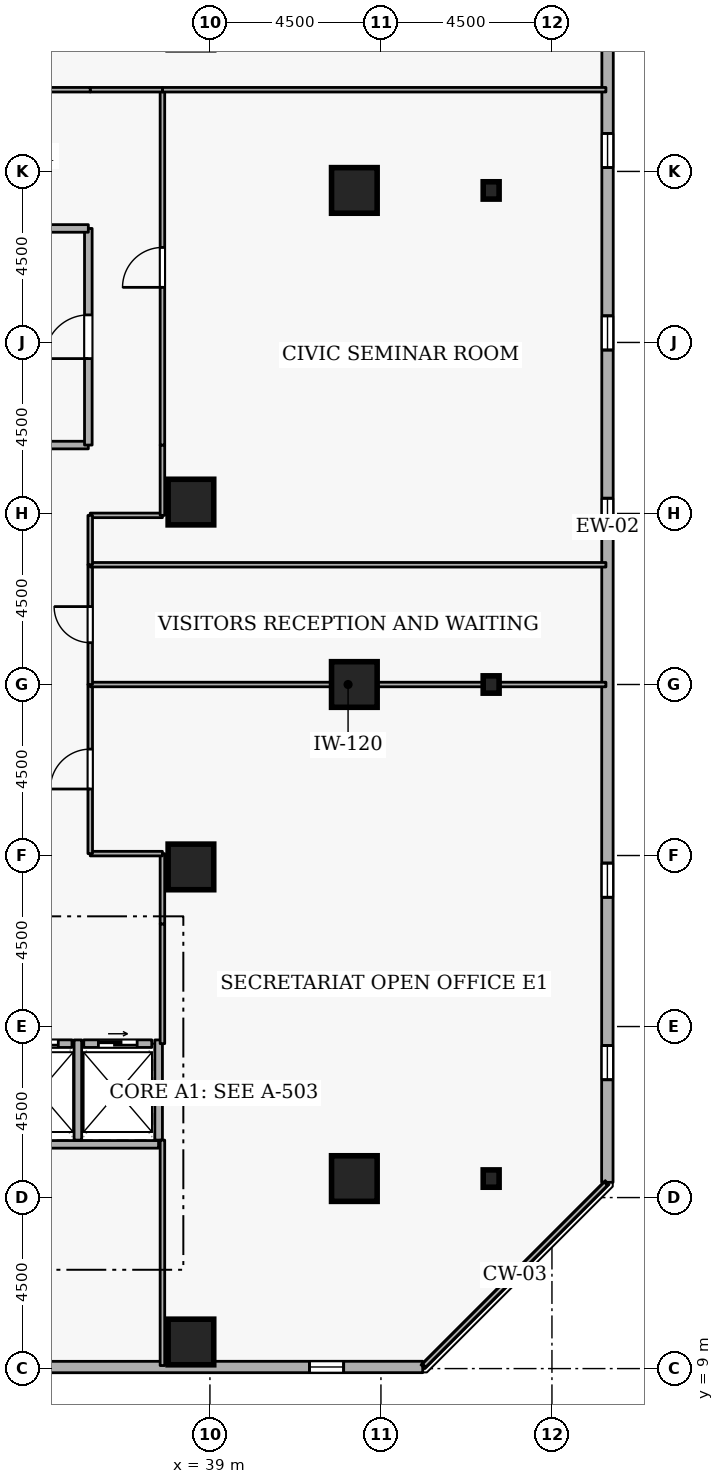
"""IFC4 building model, lengths in metres.
Left out: names, types, materials, properties, quantities, classifications, styles, units other than length and angle.
Written with IfcOpenShell. Run it as: python <this file> out.ifc"""

import sys

from ifc_helpers import new_model, si_unit, direction, frame, frame_2d, origin, origin_2d, place, context, subcontext, project, spatial, rectangle, i_section, extrude, element, fill, save


model = new_model("IFC4")
c1 = context("Model", 3, precision=1e-05, world=origin(), true_north=direction((0.0, 1.0)))
c2 = subcontext(c1, "Body", "Model", "MODEL_VIEW")
j1 = project(units=[si_unit("LENGTHUNIT", "METRE"), si_unit("PLANEANGLEUNIT", "RADIAN")], contexts=[c1])
p1 = place(None, origin())
s1 = spatial("IfcSite", under=j1, at=p1, CompositionType="ELEMENT")
p2 = place(p1, origin())
s2 = spatial("IfcBuilding", under=s1, at=p2, CompositionType="ELEMENT")
p3 = place(p2, frame((0.0, 0.0, 90.9)))
s3 = spatial("IfcBuildingStorey", under=s2, at=p3, CompositionType="ELEMENT", Elevation=90.9)
for number, where, z_axis, x_axis in (
    (1, (38.5, 9.7, 0.0), (0.0, 0.0, 1.0), (1.0, 0.0, 0.0)),
    (2, (42.8, 14.0, 0.0), (0.0, 0.0, 1.0), (1.0, 0.0, 0.0)),
    (3, (42.8, 27.0, 0.0), (0.0, 0.0, 1.0), (1.0, 0.0, 0.0)),
    (4, (42.8, 40.0, 0.0), (0.0, 0.0, 1.0), (1.0, 0.0, 0.0)),
    (5, (38.5, 22.2, 0.0), (0.0, 0.0, 1.0), (1.0, 0.0, 0.0)),
    (6, (38.5, 31.8, 0.0), (0.0, 0.0, 1.0), (1.0, 0.0, 0.0)),
):
    element("IfcColumn", number, at=place(p3, frame(where, z_axis=z_axis, x_axis=x_axis)), inside=s3, PredefinedType="COLUMN", context=c2, shape_type="SweptSolid", body=[
        extrude(rectangle(XDim=1.2, YDim=1.2, at=origin_2d()), origin(), (0.0, 0.0, 1.0), 3.6),
    ])
for number, where, z_axis, x_axis in (
    (7, (46.4, 14.0, 0.0), (0.0, 0.0, 1.0), (1.0, 0.0, 0.0)),
    (8, (46.4, 27.0, 0.0), (0.0, 0.0, 1.0), (1.0, 0.0, 0.0)),
    (9, (46.4, 40.0, 0.0), (0.0, 0.0, 1.0), (1.0, 0.0, 0.0)),
):
    element("IfcColumn", number, at=place(p3, frame(where, z_axis=z_axis, x_axis=x_axis)), inside=s3, PredefinedType="COLUMN", context=c2, shape_type="SweptSolid", body=[
        extrude(i_section(OverallWidth=0.418, OverallDepth=0.456, WebThickness=0.042, FlangeThickness=0.067, FilletRadius=0.015, at=origin_2d()), origin(), (0.0, 0.0, 1.0), 3.6),
    ])
p4 = place(p3, frame((10.119, 9.035, 0.0), z_axis=(0.0, 0.0, 1.0), x_axis=(0.99999997744, 0.000212414941, 0.0)))
e10 = element("IfcWall", 10, at=p4, inside=s3, PredefinedType="STANDARD", context=c2, shape_type="SweptSolid", body=[
    extrude(rectangle(XDim=34.481, YDim=0.3, at=frame_2d((17.24, 0.0))), origin(), (0.0, 0.0, 1.0), 2.7),
])
p5 = place(p4, frame((7.5, 0.0, 0.72)))
e11 = element("IfcOpeningElement", 11, at=p5, cuts=e10, PredefinedType="OPENING", context=c2, shape_type="SweptSolid", body=[
    extrude(rectangle(XDim=0.9, YDim=1.75, at=frame_2d((0.45, 0.875))), frame((0.0, 0.16, 0.0), z_axis=(0.0, -1.0, 0.0), x_axis=(1.0, 0.0, 0.0)), (0.0, 0.0, 1.0), 0.32),
])
p6 = place(p4, frame((12.3, 0.0, 0.72)))
e12 = element("IfcOpeningElement", 12, at=p6, cuts=e10, PredefinedType="OPENING", context=c2, shape_type="SweptSolid", body=[
    extrude(rectangle(XDim=0.9, YDim=1.75, at=frame_2d((0.45, 0.875))), frame((0.0, 0.16, 0.0), z_axis=(0.0, -1.0, 0.0), x_axis=(1.0, 0.0, 0.0)), (0.0, 0.0, 1.0), 0.32),
])
p7 = place(p4, frame((17.1, 0.0, 0.72)))
e13 = element("IfcOpeningElement", 13, at=p7, cuts=e10, PredefinedType="OPENING", context=c2, shape_type="SweptSolid", body=[
    extrude(rectangle(XDim=0.9, YDim=1.75, at=frame_2d((0.45, 0.875))), frame((0.0, 0.16, 0.0), z_axis=(0.0, -1.0, 0.0), x_axis=(1.0, 0.0, 0.0)), (0.0, 0.0, 1.0), 0.32),
])
p8 = place(p4, frame((21.9, 0.0, 0.72)))
e14 = element("IfcOpeningElement", 14, at=p8, cuts=e10, PredefinedType="OPENING", context=c2, shape_type="SweptSolid", body=[
    extrude(rectangle(XDim=0.9, YDim=1.75, at=frame_2d((0.45, 0.875))), frame((0.0, 0.16, 0.0), z_axis=(0.0, -1.0, 0.0), x_axis=(1.0, 0.0, 0.0)), (0.0, 0.0, 1.0), 0.32),
])
p9 = place(p4, frame((31.5, 0.0, 0.72)))
e15 = element("IfcOpeningElement", 15, at=p9, cuts=e10, PredefinedType="OPENING", context=c2, shape_type="SweptSolid", body=[
    extrude(rectangle(XDim=0.9, YDim=1.75, at=frame_2d((0.45, 0.875))), frame((0.0, 0.16, 0.0), z_axis=(0.0, -1.0, 0.0), x_axis=(1.0, 0.0, 0.0)), (0.0, 0.0, 1.0), 0.32),
])
p10 = place(p3, frame((49.457, 13.901, 0.0), z_axis=(0.0, 0.0, 1.0), x_axis=(0.000212414941, 0.99999997744, 0.0)))
e16 = element("IfcWall", 16, at=p10, inside=s3, PredefinedType="STANDARD", context=c2, shape_type="SweptSolid", body=[
    extrude(rectangle(XDim=34.481, YDim=0.3, at=frame_2d((17.24, 0.0))), origin(), (0.0, 0.0, 1.0), 2.7),
])
p11 = place(p10, frame((2.7, 0.0, 0.72)))
e17 = element("IfcOpeningElement", 17, at=p11, cuts=e16, PredefinedType="OPENING", context=c2, shape_type="SweptSolid", body=[
    extrude(rectangle(XDim=0.9, YDim=1.75, at=frame_2d((0.45, 0.875))), frame((0.0, 0.16, 0.0), z_axis=(0.0, -1.0, 0.0), x_axis=(1.0, 0.0, 0.0)), (0.0, 0.0, 1.0), 0.32),
])
p12 = place(p10, frame((7.5, 0.0, 0.72)))
e18 = element("IfcOpeningElement", 18, at=p12, cuts=e16, PredefinedType="OPENING", context=c2, shape_type="SweptSolid", body=[
    extrude(rectangle(XDim=0.9, YDim=1.75, at=frame_2d((0.45, 0.875))), frame((0.0, 0.16, 0.0), z_axis=(0.0, -1.0, 0.0), x_axis=(1.0, 0.0, 0.0)), (0.0, 0.0, 1.0), 0.32),
])
p13 = place(p10, frame((17.1, 0.0, 0.72)))
e19 = element("IfcOpeningElement", 19, at=p13, cuts=e16, PredefinedType="OPENING", context=c2, shape_type="SweptSolid", body=[
    extrude(rectangle(XDim=0.9, YDim=1.75, at=frame_2d((0.45, 0.875))), frame((0.0, 0.16, 0.0), z_axis=(0.0, -1.0, 0.0), x_axis=(1.0, 0.0, 0.0)), (0.0, 0.0, 1.0), 0.32),
])
p14 = place(p10, frame((21.9, 0.0, 0.72)))
e20 = element("IfcOpeningElement", 20, at=p14, cuts=e16, PredefinedType="OPENING", context=c2, shape_type="SweptSolid", body=[
    extrude(rectangle(XDim=0.9, YDim=1.75, at=frame_2d((0.45, 0.875))), frame((0.0, 0.16, 0.0), z_axis=(0.0, -1.0, 0.0), x_axis=(1.0, 0.0, 0.0)), (0.0, 0.0, 1.0), 0.32),
])
p15 = place(p10, frame((26.7, 0.0, 0.72)))
e21 = element("IfcOpeningElement", 21, at=p15, cuts=e16, PredefinedType="OPENING", context=c2, shape_type="SweptSolid", body=[
    extrude(rectangle(XDim=0.9, YDim=1.75, at=frame_2d((0.45, 0.875))), frame((0.0, 0.16, 0.0), z_axis=(0.0, -1.0, 0.0), x_axis=(1.0, 0.0, 0.0)), (0.0, 0.0, 1.0), 0.32),
])
p16 = place(p10, frame((31.5, 0.0, 0.72)))
e22 = element("IfcOpeningElement", 22, at=p16, cuts=e16, PredefinedType="OPENING", context=c2, shape_type="SweptSolid", body=[
    extrude(rectangle(XDim=0.9, YDim=1.75, at=frame_2d((0.45, 0.875))), frame((0.0, 0.16, 0.0), z_axis=(0.0, -1.0, 0.0), x_axis=(1.0, 0.0, 0.0)), (0.0, 0.0, 1.0), 0.32),
])
p17 = place(p3, frame((33.63, 17.55, 0.0), z_axis=(0.0, 0.0, 1.0), x_axis=(1.0, 0.0, 0.0)))
e23 = element("IfcWall", 23, at=p17, inside=s3, PredefinedType="STANDARD", context=c2, shape_type="SweptSolid", body=[
    extrude(rectangle(XDim=1.74, YDim=0.2, at=frame_2d((0.87, 0.0))), origin(), (0.0, 0.0, 1.0), 3.34),
])
p18 = place(p17, frame((0.36, 0.0, 0.0)))
e24 = element("IfcOpeningElement", 24, at=p18, cuts=e23, PredefinedType="OPENING", context=c2, shape_type="SweptSolid", body=[
    extrude(rectangle(XDim=1.02, YDim=2.06, at=frame_2d((0.51, 1.03))), frame((0.0, 0.11, 0.0), z_axis=(0.0, -1.0, 0.0), x_axis=(1.0, 0.0, 0.0)), (0.0, 0.0, 1.0), 0.22),
])
p19 = place(p3, frame((35.68, 17.55, 0.0), z_axis=(0.0, 0.0, 1.0), x_axis=(1.0, 0.0, 0.0)))
e25 = element("IfcWall", 25, at=p19, inside=s3, PredefinedType="STANDARD", context=c2, shape_type="SweptSolid", body=[
    extrude(rectangle(XDim=1.79, YDim=0.2, at=frame_2d((0.895, 0.0))), origin(), (0.0, 0.0, 1.0), 3.34),
])
p20 = place(p19, frame((0.385, 0.0, 0.0)))
e26 = element("IfcOpeningElement", 26, at=p20, cuts=e25, PredefinedType="OPENING", context=c2, shape_type="SweptSolid", body=[
    extrude(rectangle(XDim=1.02, YDim=2.06, at=frame_2d((0.51, 1.03))), frame((0.0, 0.11, 0.0), z_axis=(0.0, -1.0, 0.0), x_axis=(1.0, 0.0, 0.0)), (0.0, 0.0, 1.0), 0.22),
])
p21 = place(p3, frame((33.452, 14.9, 0.0), z_axis=(0.0, 0.0, 1.0), x_axis=(1.0, 0.0, 0.0)))
e27 = element("IfcWall", 27, at=p21, inside=s3, PredefinedType="STANDARD", context=c2, shape_type="SweptSolid", body=[
    extrude(rectangle(XDim=4.196, YDim=0.2, at=frame_2d((2.098, 0.0))), origin(), (0.0, 0.0, 1.0), 3.34),
])
for number, where, z_axis, x_axis in (
    (28, (35.525, 15.012, 0.0), (0.0, 0.0, 1.0), (0.0, 1.0, 0.0)),
    (29, (37.65, 15.012, 0.0), (0.0, 0.0, 1.0), (0.0, 1.0, 0.0)),
):
    element("IfcWall", number, at=place(p3, frame(where, z_axis=z_axis, x_axis=x_axis)), inside=s3, PredefinedType="STANDARD", context=c2, shape_type="SweptSolid", body=[
        extrude(rectangle(XDim=2.636, YDim=0.2, at=frame_2d((1.318, 0.0))), origin(), (0.0, 0.0, 1.0), 3.34),
    ])
p22 = place(p3, frame((33.3, 33.3, 0.0), z_axis=(0.0, 0.0, 1.0), x_axis=(1.0, 0.0, 0.0)))
e30 = element("IfcWall", 30, at=p22, inside=s3, PredefinedType="STANDARD", context=c2, shape_type="SweptSolid", body=[
    extrude(rectangle(XDim=2.5, YDim=0.2, at=frame_2d((1.25, 0.0))), origin(), (0.0, 0.0, 1.0), 3.34),
])
p23 = place(p3, frame((35.8, 33.3, 0.0), z_axis=(0.0, 0.0, 1.0), x_axis=(0.0, 1.0, 0.0)))
e31 = element("IfcWall", 31, at=p23, inside=s3, PredefinedType="STANDARD", context=c2, shape_type="SweptSolid", body=[
    extrude(rectangle(XDim=5.7, YDim=0.2, at=frame_2d((2.85, 0.0))), origin(), (0.0, 0.0, 1.0), 3.34),
])
p24 = place(p23, frame((2.275, 0.0, 0.0)))
e32 = element("IfcOpeningElement", 32, at=p24, cuts=e31, PredefinedType="OPENING", context=c2, shape_type="SweptSolid", body=[
    extrude(rectangle(XDim=1.15, YDim=2.1, at=frame_2d((0.575, 1.05))), frame((0.0, 0.11, 0.0), z_axis=(0.0, -1.0, 0.0), x_axis=(1.0, 0.0, 0.0)), (0.0, 0.0, 1.0), 0.22),
])
p25 = place(p3, frame((35.8, 39.0, 0.0), z_axis=(0.0, 0.0, 1.0), x_axis=(-1.0, 0.0, 0.0)))
e33 = element("IfcWall", 33, at=p25, inside=s3, PredefinedType="STANDARD", context=c2, shape_type="SweptSolid", body=[
    extrude(rectangle(XDim=2.5, YDim=0.2, at=frame_2d((1.25, 0.0))), origin(), (0.0, 0.0, 1.0), 3.34),
])
p26 = place(p3, frame((37.75, 17.55, 0.0), z_axis=(0.0, 0.0, 1.0), x_axis=(0.0, 1.0, 0.0)))
e34 = element("IfcWall", 34, at=p26, inside=s3, PredefinedType="PARTITIONING", context=c2, shape_type="SweptSolid", body=[
    extrude(rectangle(XDim=3.15, YDim=0.12, at=frame_2d((1.575, 0.0))), origin(), (0.0, 0.0, 1.0), 3.34),
])
p27 = place(p3, frame((37.75, 20.7, 0.0), z_axis=(0.0, 0.0, 1.0), x_axis=(0.0, 1.0, 0.0)))
e35 = element("IfcWall", 35, at=p27, inside=s3, PredefinedType="PARTITIONING", context=c2, shape_type="SweptSolid", body=[
    extrude(rectangle(XDim=1.85, YDim=0.12, at=frame_2d((0.925, 0.0))), origin(), (0.0, 0.0, 1.0), 3.34),
])
p28 = place(p3, frame((37.75, 22.55, 0.0), z_axis=(0.0, 0.0, 1.0), x_axis=(-1.0, 0.0, 0.0)))
e36 = element("IfcWall", 36, at=p28, inside=s3, PredefinedType="PARTITIONING", context=c2, shape_type="SweptSolid", body=[
    extrude(rectangle(XDim=1.9, YDim=0.12, at=frame_2d((0.95, 0.0))), origin(), (0.0, 0.0, 1.0), 3.34),
])
p29 = place(p3, frame((35.85, 22.55, 0.0), z_axis=(0.0, 0.0, 1.0), x_axis=(0.0, 1.0, 0.0)))
e37 = element("IfcWall", 37, at=p29, inside=s3, PredefinedType="PARTITIONING", context=c2, shape_type="SweptSolid", body=[
    extrude(rectangle(XDim=4.45, YDim=0.12, at=frame_2d((2.225, 0.0))), origin(), (0.0, 0.0, 1.0), 3.34),
])
p30 = place(p29, frame((1.7, 0.0, 0.0)))
e38 = element("IfcOpeningElement", 38, at=p30, cuts=e37, PredefinedType="OPENING", context=c2, shape_type="SweptSolid", body=[
    extrude(rectangle(XDim=1.05, YDim=2.1, at=frame_2d((0.525, 1.05))), frame((0.0, 0.07, 0.0), z_axis=(0.0, -1.0, 0.0), x_axis=(1.0, 0.0, 0.0)), (0.0, 0.0, 1.0), 0.14),
])
p31 = place(p3, frame((35.85, 27.0, 0.0), z_axis=(0.0, 0.0, 1.0), x_axis=(1.0, 0.0, 0.0)))
e39 = element("IfcWall", 39, at=p31, inside=s3, PredefinedType="PARTITIONING", context=c2, shape_type="SweptSolid", body=[
    extrude(rectangle(XDim=13.57, YDim=0.12, at=frame_2d((6.785, 0.0))), origin(), (0.0, 0.0, 1.0), 2.932),
])
p32 = place(p3, frame((49.42, 13.865, 0.0), z_axis=(0.0, 0.0, 1.0), x_axis=(-0.707106781187, -0.707106781187, 0.0)))
e40 = element("IfcWall", 40, at=p32, inside=s3, PredefinedType="PARTITIONING", context=c2, shape_type="SweptSolid", body=[
    extrude(rectangle(XDim=6.768, YDim=0.12, at=frame_2d((3.384, 0.0))), origin(), (0.0, 0.0, 1.0), 3.34),
])
p33 = place(p3, frame((37.75, 9.08, 0.0), z_axis=(0.0, 0.0, 1.0), x_axis=(0.0, 1.0, 0.0)))
e41 = element("IfcWall", 41, at=p33, inside=s3, PredefinedType="PARTITIONING", context=c2, shape_type="SweptSolid", body=[
    extrude(rectangle(XDim=5.932, YDim=0.12, at=frame_2d((2.966, 0.0))), origin(), (0.0, 0.0, 1.0), 3.34),
])
p34 = place(p3, frame((35.85, 27.0, 0.0), z_axis=(0.0, 0.0, 1.0), x_axis=(0.0, 1.0, 0.0)))
e42 = element("IfcWall", 42, at=p34, inside=s3, PredefinedType="PARTITIONING", context=c2, shape_type="SweptSolid", body=[
    extrude(rectangle(XDim=3.15, YDim=0.12, at=frame_2d((1.575, 0.0))), origin(), (0.0, 0.0, 1.0), 3.34),
])
p35 = place(p34, frame((1.1, 0.0, 0.0)))
e43 = element("IfcOpeningElement", 43, at=p35, cuts=e42, PredefinedType="OPENING", context=c2, shape_type="SweptSolid", body=[
    extrude(rectangle(XDim=0.95, YDim=2.1, at=frame_2d((0.475, 1.05))), frame((0.0, 0.07, 0.0), z_axis=(0.0, -1.0, 0.0), x_axis=(1.0, 0.0, 0.0)), (0.0, 0.0, 1.0), 0.14),
])
p36 = place(p3, frame((35.85, 30.15, 0.0), z_axis=(0.0, 0.0, 1.0), x_axis=(1.0, 0.0, 0.0)))
e44 = element("IfcWall", 44, at=p36, inside=s3, PredefinedType="PARTITIONING", context=c2, shape_type="SweptSolid", body=[
    extrude(rectangle(XDim=13.57, YDim=0.12, at=frame_2d((6.785, 0.0))), origin(), (0.0, 0.0, 1.0), 3.34),
])
p37 = place(p3, frame((35.85, 31.45, 0.0), z_axis=(0.0, 0.0, 1.0), x_axis=(1.0, 0.0, 0.0)))
e45 = element("IfcWall", 45, at=p37, inside=s3, PredefinedType="PARTITIONING", context=c2, shape_type="SweptSolid", body=[
    extrude(rectangle(XDim=1.9, YDim=0.12, at=frame_2d((0.95, 0.0))), origin(), (0.0, 0.0, 1.0), 3.34),
])
p38 = place(p3, frame((37.75, 31.45, 0.0), z_axis=(0.0, 0.0, 1.0), x_axis=(0.0, 1.0, 0.0)))
e46 = element("IfcWall", 46, at=p38, inside=s3, PredefinedType="PARTITIONING", context=c2, shape_type="SweptSolid", body=[
    extrude(rectangle(XDim=1.85, YDim=0.12, at=frame_2d((0.925, 0.0))), origin(), (0.0, 0.0, 1.0), 3.34),
])
p39 = place(p3, frame((37.75, 33.3, 0.0), z_axis=(0.0, 0.0, 1.0), x_axis=(0.0, 1.0, 0.0)))
e47 = element("IfcWall", 47, at=p39, inside=s3, PredefinedType="PARTITIONING", context=c2, shape_type="SweptSolid", body=[
    extrude(rectangle(XDim=9.35, YDim=0.12, at=frame_2d((4.675, 0.0))), origin(), (0.0, 0.0, 1.0), 3.34),
])
p40 = place(p39, frame((4.15, 0.0, 0.0)))
e48 = element("IfcOpeningElement", 48, at=p40, cuts=e47, PredefinedType="OPENING", context=c2, shape_type="SweptSolid", body=[
    extrude(rectangle(XDim=1.05, YDim=2.1, at=frame_2d((0.525, 1.05))), frame((0.0, 0.07, 0.0), z_axis=(0.0, -1.0, 0.0), x_axis=(1.0, 0.0, 0.0)), (0.0, 0.0, 1.0), 0.14),
])
p41 = place(p3, frame((37.75, 42.65, 0.0), z_axis=(0.0, 0.0, 1.0), x_axis=(1.0, 0.0, 0.0)))
e49 = element("IfcWall", 49, at=p41, inside=s3, PredefinedType="PARTITIONING", context=c2, shape_type="SweptSolid", body=[
    extrude(rectangle(XDim=11.67, YDim=0.12, at=frame_2d((5.835, 0.0))), origin(), (0.0, 0.0, 1.0), 3.34),
])
p42 = place(p3, frame((35.85, 30.15, 0.0), z_axis=(0.0, 0.0, 1.0), x_axis=(0.0, 1.0, 0.0)))
e50 = element("IfcWall", 50, at=p42, inside=s3, PredefinedType="PARTITIONING", context=c2, shape_type="SweptSolid", body=[
    extrude(rectangle(XDim=1.3, YDim=0.12, at=frame_2d((0.65, 0.0))), origin(), (0.0, 0.0, 1.0), 3.34),
])
p43 = place(p3, frame((37.75, 42.65, 0.0), z_axis=(0.0, 0.0, 1.0), x_axis=(-1.0, 0.0, 0.0)))
e51 = element("IfcWall", 51, at=p43, inside=s3, PredefinedType="PARTITIONING", context=c2, shape_type="SweptSolid", body=[
    extrude(rectangle(XDim=1.9, YDim=0.12, at=frame_2d((0.95, 0.0))), origin(), (0.0, 0.0, 1.0), 2.895),
])
p44 = place(p3, frame((35.85, 42.65, 0.0), z_axis=(0.0, 0.0, 1.0), x_axis=(-1.0, 0.0, 0.0)))
e52 = element("IfcWall", 52, at=p44, inside=s3, PredefinedType="PARTITIONING", context=c2, shape_type="SweptSolid", body=[
    extrude(rectangle(XDim=4.85, YDim=0.12, at=frame_2d((2.425, 0.0))), origin(), (0.0, 0.0, 1.0), 2.895),
])
p45 = place(p44, frame((1.9, 0.0, 0.0)))
e53 = element("IfcOpeningElement", 53, at=p45, cuts=e52, PredefinedType="OPENING", context=c2, shape_type="SweptSolid", body=[
    extrude(rectangle(XDim=1.05, YDim=2.1, at=frame_2d((0.525, 1.05))), frame((0.0, 0.07, 0.0), z_axis=(0.0, -1.0, 0.0), x_axis=(1.0, 0.0, 0.0)), (0.0, 0.0, 1.0), 0.14),
])
p46 = place(p9, origin())
e54 = element("IfcWindow", 54, at=p46, inside=s3, PartitioningType="SINGLE_PANEL", PredefinedType="WINDOW", context=c2, shape_type="SweptSolid", body=[
    extrude(rectangle(XDim=0.9, YDim=1.75, at=frame_2d((0.45, 0.875))), frame((0.0, 0.03, 0.0), z_axis=(0.0, -1.0, 0.0), x_axis=(1.0, 0.0, 0.0)), (0.0, 0.0, 1.0), 0.06),
])
fill(e15, e54)
p47 = place(p11, origin())
e55 = element("IfcWindow", 55, at=p47, inside=s3, PartitioningType="SINGLE_PANEL", PredefinedType="WINDOW", context=c2, shape_type="SweptSolid", body=[
    extrude(rectangle(XDim=0.9, YDim=1.75, at=frame_2d((0.45, 0.875))), frame((0.0, 0.03, 0.0), z_axis=(0.0, -1.0, 0.0), x_axis=(1.0, 0.0, 0.0)), (0.0, 0.0, 1.0), 0.06),
])
fill(e17, e55)
p48 = place(p12, origin())
e56 = element("IfcWindow", 56, at=p48, inside=s3, PartitioningType="SINGLE_PANEL", PredefinedType="WINDOW", context=c2, shape_type="SweptSolid", body=[
    extrude(rectangle(XDim=0.9, YDim=1.75, at=frame_2d((0.45, 0.875))), frame((0.0, 0.03, 0.0), z_axis=(0.0, -1.0, 0.0), x_axis=(1.0, 0.0, 0.0)), (0.0, 0.0, 1.0), 0.06),
])
fill(e18, e56)
p49 = place(p13, origin())
e57 = element("IfcWindow", 57, at=p49, inside=s3, PartitioningType="SINGLE_PANEL", PredefinedType="WINDOW", context=c2, shape_type="SweptSolid", body=[
    extrude(rectangle(XDim=0.9, YDim=1.75, at=frame_2d((0.45, 0.875))), frame((0.0, 0.03, 0.0), z_axis=(0.0, -1.0, 0.0), x_axis=(1.0, 0.0, 0.0)), (0.0, 0.0, 1.0), 0.06),
])
fill(e19, e57)
p50 = place(p14, origin())
e58 = element("IfcWindow", 58, at=p50, inside=s3, PartitioningType="SINGLE_PANEL", PredefinedType="WINDOW", context=c2, shape_type="SweptSolid", body=[
    extrude(rectangle(XDim=0.9, YDim=1.75, at=frame_2d((0.45, 0.875))), frame((0.0, 0.03, 0.0), z_axis=(0.0, -1.0, 0.0), x_axis=(1.0, 0.0, 0.0)), (0.0, 0.0, 1.0), 0.06),
])
fill(e20, e58)
p51 = place(p15, origin())
e59 = element("IfcWindow", 59, at=p51, inside=s3, PartitioningType="SINGLE_PANEL", PredefinedType="WINDOW", context=c2, shape_type="SweptSolid", body=[
    extrude(rectangle(XDim=0.9, YDim=1.75, at=frame_2d((0.45, 0.875))), frame((0.0, 0.03, 0.0), z_axis=(0.0, -1.0, 0.0), x_axis=(1.0, 0.0, 0.0)), (0.0, 0.0, 1.0), 0.06),
])
fill(e21, e59)
p52 = place(p18, origin())
e60 = element("IfcDoor", 60, at=p52, inside=s3, OperationType="SLIDING_TO_LEFT", PredefinedType="DOOR", context=c2, shape_type="SweptSolid", body=[
    extrude(rectangle(XDim=1.02, YDim=2.06, at=frame_2d((0.51, 1.03))), frame((0.0, 0.025, 0.0), z_axis=(0.0, -1.0, 0.0), x_axis=(1.0, 0.0, 0.0)), (0.0, 0.0, 1.0), 0.05),
])
fill(e24, e60)
p53 = place(p20, origin())
e61 = element("IfcDoor", 61, at=p53, inside=s3, OperationType="SLIDING_TO_LEFT", PredefinedType="DOOR", context=c2, shape_type="SweptSolid", body=[
    extrude(rectangle(XDim=1.02, YDim=2.06, at=frame_2d((0.51, 1.03))), frame((0.0, 0.025, 0.0), z_axis=(0.0, -1.0, 0.0), x_axis=(1.0, 0.0, 0.0)), (0.0, 0.0, 1.0), 0.05),
])
fill(e26, e61)
p54 = place(p24, origin())
e62 = element("IfcDoor", 62, at=p54, inside=s3, OperationType="SINGLE_SWING_LEFT", PredefinedType="DOOR", context=c2, shape_type="SweptSolid", body=[
    extrude(rectangle(XDim=1.15, YDim=2.1, at=frame_2d((0.575, 1.05))), frame((0.0, 0.025, 0.0), z_axis=(0.0, -1.0, 0.0), x_axis=(1.0, 0.0, 0.0)), (0.0, 0.0, 1.0), 0.05),
])
fill(e32, e62)
p55 = place(p30, origin())
e63 = element("IfcDoor", 63, at=p55, inside=s3, OperationType="SINGLE_SWING_LEFT", PredefinedType="DOOR", context=c2, shape_type="SweptSolid", body=[
    extrude(rectangle(XDim=1.05, YDim=2.1, at=frame_2d((0.525, 1.05))), frame((0.0, 0.025, 0.0), z_axis=(0.0, -1.0, 0.0), x_axis=(1.0, 0.0, 0.0)), (0.0, 0.0, 1.0), 0.05),
])
fill(e38, e63)
p56 = place(p35, origin())
e64 = element("IfcDoor", 64, at=p56, inside=s3, OperationType="SINGLE_SWING_RIGHT", PredefinedType="DOOR", context=c2, shape_type="SweptSolid", body=[
    extrude(rectangle(XDim=0.95, YDim=2.1, at=frame_2d((0.475, 1.05))), frame((0.0, 0.025, 0.0), z_axis=(0.0, -1.0, 0.0), x_axis=(1.0, 0.0, 0.0)), (0.0, 0.0, 1.0), 0.05),
])
fill(e43, e64)
p57 = place(p40, origin())
e65 = element("IfcDoor", 65, at=p57, inside=s3, OperationType="SINGLE_SWING_LEFT", PredefinedType="DOOR", context=c2, shape_type="SweptSolid", body=[
    extrude(rectangle(XDim=1.05, YDim=2.1, at=frame_2d((0.525, 1.05))), frame((0.0, 0.025, 0.0), z_axis=(0.0, -1.0, 0.0), x_axis=(1.0, 0.0, 0.0)), (0.0, 0.0, 1.0), 0.05),
])
fill(e48, e65)
save(model, sys.argv[1])
